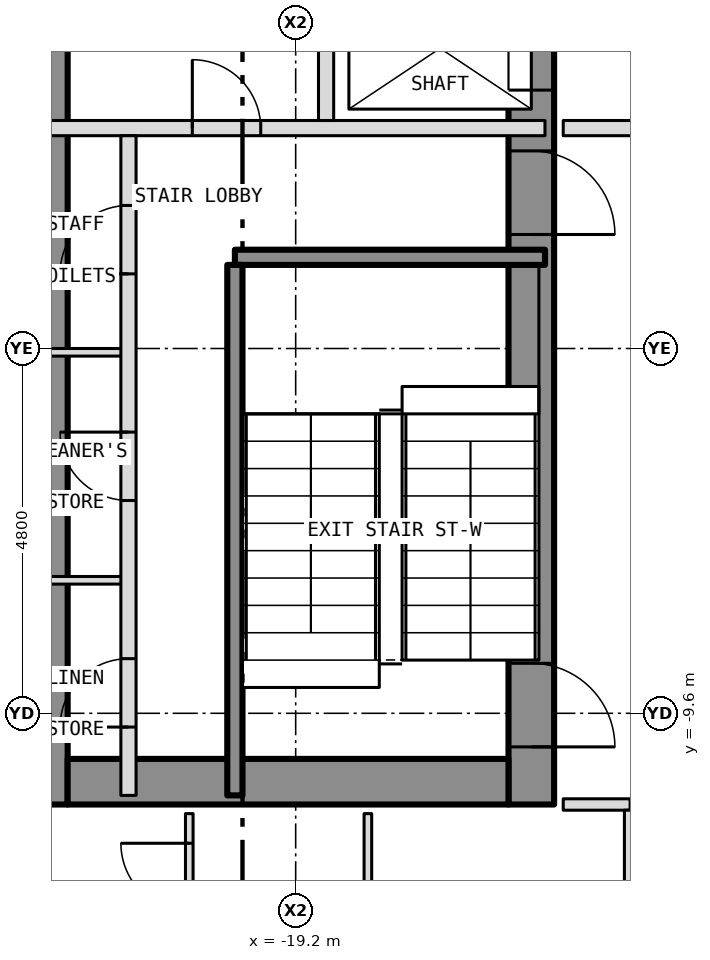
"""IFC4 building model, lengths in metres.
Left out: names, types, materials, properties, quantities, classifications, styles, units other than length and angle.
Written with IfcOpenShell. Run it as: python <this file> out.ifc"""

import sys

from ifc_helpers import new_model, si_unit, direction, frame, frame_2d, origin, place, context, subcontext, project, spatial, rectangle, extrude, element, fill, save


model = new_model("IFC4")
c1 = context("Model", 3, precision=1e-05, world=origin(), true_north=direction((0.0, 1.0)))
c2 = subcontext(c1, "Body", "Model", "MODEL_VIEW")
j1 = project(units=[si_unit("LENGTHUNIT", "METRE"), si_unit("PLANEANGLEUNIT", "RADIAN")], contexts=[c1])
p1 = place(None, origin())
s1 = spatial("IfcSite", under=j1, at=p1, CompositionType="ELEMENT")
p2 = place(p1, origin())
s2 = spatial("IfcBuilding", under=s1, at=p2, CompositionType="ELEMENT")
p3 = place(p2, frame((0.0, 0.0, 110.0)))
s3 = spatial("IfcBuildingStorey", under=s2, at=p3, CompositionType="ELEMENT", Elevation=110.0)
p4 = place(p3, frame((-16.1, -10.8, 0.0), z_axis=(0.0, 0.0, 1.0), x_axis=(0.0, 1.0, 0.0)))
e1 = element("IfcWall", 1, at=p4, inside=s3, PredefinedType="SHEAR", context=c2, shape_type="SweptSolid", body=[
    extrude(rectangle(XDim=21.6, YDim=0.6, at=frame_2d((10.8, 0.0))), origin(), (0.0, 0.0, 1.0), 3.25),
])
p5 = place(p4, frame((9.4, 0.0, 0.0)))
e2 = element("IfcOpeningElement", 2, at=p5, cuts=e1, PredefinedType="OPENING", context=c2, shape_type="SweptSolid", body=[
    extrude(rectangle(XDim=1.1, YDim=2.1, at=frame_2d((0.55, 1.05))), frame((0.0, 0.312, 0.0), z_axis=(0.0, -1.0, 0.0), x_axis=(1.0, 0.0, 0.0)), (0.0, 0.0, 1.0), 0.624),
])
p6 = place(p4, frame((11.5, 0.0, 0.0)))
e3 = element("IfcOpeningElement", 3, at=p6, cuts=e1, PredefinedType="OPENING", context=c2, shape_type="SweptSolid", body=[
    extrude(rectangle(XDim=1.1, YDim=2.1, at=frame_2d((0.55, 1.05))), frame((0.0, 0.312, 0.0), z_axis=(0.0, -1.0, 0.0), x_axis=(1.0, 0.0, 0.0)), (0.0, 0.0, 1.0), 0.624),
])
p7 = place(p4, frame((13.6, 0.0, 0.0)))
e4 = element("IfcOpeningElement", 4, at=p7, cuts=e1, PredefinedType="OPENING", context=c2, shape_type="SweptSolid", body=[
    extrude(rectangle(XDim=1.1, YDim=2.1, at=frame_2d((0.55, 1.05))), frame((0.0, 0.312, 0.0), z_axis=(0.0, -1.0, 0.0), x_axis=(1.0, 0.0, 0.0)), (0.0, 0.0, 1.0), 0.624),
])
p8 = place(p4, frame((15.7, 0.0, 0.0)))
e5 = element("IfcOpeningElement", 5, at=p8, cuts=e1, PredefinedType="OPENING", context=c2, shape_type="SweptSolid", body=[
    extrude(rectangle(XDim=1.1, YDim=2.1, at=frame_2d((0.55, 1.05))), frame((0.0, 0.312, 0.0), z_axis=(0.0, -1.0, 0.0), x_axis=(1.0, 0.0, 0.0)), (0.0, 0.0, 1.0), 0.624),
])
p9 = place(p4, frame((17.8, 0.0, 0.0)))
e6 = element("IfcOpeningElement", 6, at=p9, cuts=e1, PredefinedType="OPENING", context=c2, shape_type="SweptSolid", body=[
    extrude(rectangle(XDim=1.1, YDim=2.1, at=frame_2d((0.55, 1.05))), frame((0.0, 0.312, 0.0), z_axis=(0.0, -1.0, 0.0), x_axis=(1.0, 0.0, 0.0)), (0.0, 0.0, 1.0), 0.624),
])
p10 = place(p4, frame((0.758, 0.0, 0.0)))
e7 = element("IfcOpeningElement", 7, at=p10, cuts=e1, PredefinedType="OPENING", context=c2, shape_type="SweptSolid", body=[
    extrude(rectangle(XDim=1.1, YDim=2.1, at=frame_2d((0.55, 1.05))), frame((0.0, 0.312, 0.0), z_axis=(0.0, -1.0, 0.0), x_axis=(1.0, 0.0, 0.0)), (0.0, 0.0, 1.0), 0.624),
])
p11 = place(p4, frame((7.5, 0.0, 0.0)))
e8 = element("IfcOpeningElement", 8, at=p11, cuts=e1, PredefinedType="OPENING", context=c2, shape_type="SweptSolid", body=[
    extrude(rectangle(XDim=1.1, YDim=2.1, at=frame_2d((0.55, 1.05))), frame((0.0, 0.312, 0.0), z_axis=(0.0, -1.0, 0.0), x_axis=(1.0, 0.0, 0.0)), (0.0, 0.0, 1.0), 0.624),
])
p12 = place(p3, frame((-22.5, -10.8, 0.0), z_axis=(0.0, 0.0, 1.0), x_axis=(0.0, 1.0, 0.0)))
e9 = element("IfcWall", 9, at=p12, inside=s3, PredefinedType="SHEAR", context=c2, shape_type="SweptSolid", body=[
    extrude(rectangle(XDim=21.6, YDim=0.6, at=frame_2d((10.8, 0.0))), origin(), (0.0, 0.0, 1.0), 3.25),
])
p13 = place(p3, frame((-22.2, -10.5, 0.0), z_axis=(0.0, 0.0, 1.0), x_axis=(1.0, 0.0, 0.0)))
e10 = element("IfcWall", 10, at=p13, inside=s3, PredefinedType="SHEAR", context=c2, shape_type="SweptSolid", body=[
    extrude(rectangle(XDim=5.8, YDim=0.6, at=frame_2d((2.9, 0.0))), origin(), (0.0, 0.0, 1.0), 3.25),
])
p14 = place(p3, frame((-15.68, -10.8, 0.0), z_axis=(0.0, 0.0, 1.0), x_axis=(1.0, 0.0, 0.0)))
e11 = element("IfcWall", 11, at=p14, inside=s3, PredefinedType="PARTITIONING", context=c2, shape_type="SweptSolid", body=[
    extrude(rectangle(XDim=0.88, YDim=0.15, at=frame_2d((0.44, 0.0))), origin(), (0.0, 0.0, 1.0), 3.35),
])
for number, where, z_axis, x_axis in (
    (12, (-22.68, -7.85, 0.0), (0.0, 0.0, 1.0), (1.0, 0.0, 0.0)),
    (13, (-22.68, -4.85, 0.0), (0.0, 0.0, 1.0), (1.0, 0.0, 0.0)),
):
    element("IfcWall", number, at=place(p3, frame(where, z_axis=z_axis, x_axis=x_axis)), inside=s3, PredefinedType="PARTITIONING", context=c2, shape_type="SweptSolid", body=[
        extrude(rectangle(XDim=1.28, YDim=0.1, at=frame_2d((0.64, 0.0))), origin(), (0.0, 0.0, 1.0), 3.25),
    ])
p15 = place(p3, frame((-20.0, -3.6, 0.0), z_axis=(0.0, 0.0, 1.0), x_axis=(1.0, 0.0, 0.0)))
e14 = element("IfcWall", 14, at=p15, inside=s3, PredefinedType="SHEAR", context=c2, shape_type="SweptSolid", body=[
    extrude(rectangle(XDim=4.08, YDim=0.2, at=frame_2d((2.04, 0.0))), origin(), (0.0, 0.0, 1.0), 3.25),
])
p16 = place(p3, frame((-22.68, -1.9, 0.0), z_axis=(0.0, 0.0, 1.0), x_axis=(1.0, 0.0, 0.0)))
e15 = element("IfcWall", 15, at=p16, inside=s3, PredefinedType="PARTITIONING", context=c2, shape_type="SweptSolid", body=[
    extrude(rectangle(XDim=6.76, YDim=0.2, at=frame_2d((3.38, 0.0))), origin(), (0.0, 0.0, 1.0), 3.25),
])
p17 = place(p16, frame((2.12, 0.0, 0.0)))
e16 = element("IfcOpeningElement", 16, at=p17, cuts=e15, PredefinedType="OPENING", context=c2, shape_type="SweptSolid", body=[
    extrude(rectangle(XDim=0.9, YDim=2.1, at=frame_2d((0.45, 1.05))), frame((0.0, 0.112, 0.0), z_axis=(0.0, -1.0, 0.0), x_axis=(1.0, 0.0, 0.0)), (0.0, 0.0, 1.0), 0.224),
])
p18 = place(p3, frame((-15.68, -1.9, 0.0), z_axis=(0.0, 0.0, 1.0), x_axis=(1.0, 0.0, 0.0)))
e17 = element("IfcWall", 17, at=p18, inside=s3, PredefinedType="PARTITIONING", context=c2, shape_type="SweptSolid", body=[
    extrude(rectangle(XDim=3.28, YDim=0.2, at=frame_2d((1.64, 0.0))), origin(), (0.0, 0.0, 1.0), 3.35),
])
p19 = place(p18, frame((0.94, 0.0, 0.0)))
e18 = element("IfcOpeningElement", 18, at=p19, cuts=e17, PredefinedType="OPENING", context=c2, shape_type="SweptSolid", body=[
    extrude(rectangle(XDim=1.1, YDim=2.1, at=frame_2d((0.55, 1.05))), frame((0.0, 0.112, 0.0), z_axis=(0.0, -1.0, 0.0), x_axis=(1.0, 0.0, 0.0)), (0.0, 0.0, 1.0), 0.224),
])
p20 = place(p3, frame((-21.4, -10.68, 0.0), z_axis=(0.0, 0.0, 1.0), x_axis=(0.0, 1.0, 0.0)))
e19 = element("IfcWall", 19, at=p20, inside=s3, PredefinedType="PARTITIONING", context=c2, shape_type="SweptSolid", body=[
    extrude(rectangle(XDim=8.68, YDim=0.2, at=frame_2d((4.34, 0.0))), origin(), (0.0, 0.0, 1.0), 3.25),
])
p21 = place(p20, frame((0.899, 0.0, 0.0)))
e20 = element("IfcOpeningElement", 20, at=p21, cuts=e19, PredefinedType="OPENING", context=c2, shape_type="SweptSolid", body=[
    extrude(rectangle(XDim=0.9, YDim=2.1, at=frame_2d((0.45, 1.05))), frame((0.0, 0.112, 0.0), z_axis=(0.0, -1.0, 0.0), x_axis=(1.0, 0.0, 0.0)), (0.0, 0.0, 1.0), 0.224),
])
p22 = place(p20, frame((3.88, 0.0, 0.0)))
e21 = element("IfcOpeningElement", 21, at=p22, cuts=e19, PredefinedType="OPENING", context=c2, shape_type="SweptSolid", body=[
    extrude(rectangle(XDim=0.9, YDim=2.1, at=frame_2d((0.45, 1.05))), frame((0.0, 0.112, 0.0), z_axis=(0.0, -1.0, 0.0), x_axis=(1.0, 0.0, 0.0)), (0.0, 0.0, 1.0), 0.224),
])
p23 = place(p20, frame((6.862, 0.0, 0.0)))
e22 = element("IfcOpeningElement", 22, at=p23, cuts=e19, PredefinedType="OPENING", context=c2, shape_type="SweptSolid", body=[
    extrude(rectangle(XDim=0.9, YDim=2.1, at=frame_2d((0.45, 1.05))), frame((0.0, 0.112, 0.0), z_axis=(0.0, -1.0, 0.0), x_axis=(1.0, 0.0, 0.0)), (0.0, 0.0, 1.0), 0.224),
])
p24 = place(p3, frame((-20.6, -13.95, 0.0), z_axis=(0.0, 0.0, 1.0), x_axis=(0.0, 1.0, 0.0)))
e23 = element("IfcWall", 23, at=p24, inside=s3, PredefinedType="PARTITIONING", context=c2, shape_type="SweptSolid", body=[
    extrude(rectangle(XDim=3.03, YDim=0.1, at=frame_2d((1.515, 0.0))), origin(), (0.0, 0.0, 1.0), 3.35),
])
p25 = place(p24, frame((1.74, 0.0, 0.0)))
e24 = element("IfcOpeningElement", 24, at=p25, cuts=e23, PredefinedType="OPENING", context=c2, shape_type="SweptSolid", body=[
    extrude(rectangle(XDim=0.9, YDim=2.1, at=frame_2d((0.45, 1.05))), frame((0.0, 0.062, 0.0), z_axis=(0.0, -1.0, 0.0), x_axis=(1.0, 0.0, 0.0)), (0.0, 0.0, 1.0), 0.124),
])
p26 = place(p3, frame((-20.0, -10.68, 0.0), z_axis=(0.0, 0.0, 1.0), x_axis=(0.0, 1.0, 0.0)))
e25 = element("IfcWall", 25, at=p26, inside=s3, PredefinedType="SHEAR", context=c2, shape_type="SweptSolid", body=[
    extrude(rectangle(XDim=6.98, YDim=0.2, at=frame_2d((3.49, 0.0))), origin(), (0.0, 0.0, 1.0), 3.25),
])
p27 = place(p3, frame((-18.8, -1.8, 0.0), z_axis=(0.0, 0.0, 1.0), x_axis=(0.0, 1.0, 0.0)))
e26 = element("IfcWall", 26, at=p27, inside=s3, PredefinedType="PARTITIONING", context=c2, shape_type="SweptSolid", body=[
    extrude(rectangle(XDim=12.48, YDim=0.2, at=frame_2d((6.24, 0.0))), origin(), (0.0, 0.0, 1.0), 3.25),
])
p28 = place(p3, frame((-18.25, -18.191, 0.0), z_axis=(0.0, 0.0, 1.0), x_axis=(0.0, 1.0, 0.0)))
e27 = element("IfcWall", 27, at=p28, inside=s3, PredefinedType="PARTITIONING", context=c2, shape_type="SweptSolid", body=[
    extrude(rectangle(XDim=7.271, YDim=0.1, at=frame_2d((3.635, 0.0))), origin(), (0.0, 0.0, 1.0), 3.35),
])
p29 = place(p28, frame((0.941, 0.0, 0.0)))
e28 = element("IfcOpeningElement", 28, at=p29, cuts=e27, PredefinedType="OPENING", context=c2, shape_type="SweptSolid", body=[
    extrude(rectangle(XDim=0.9, YDim=2.1, at=frame_2d((0.45, 1.05))), frame((0.0, 0.062, 0.0), z_axis=(0.0, -1.0, 0.0), x_axis=(1.0, 0.0, 0.0)), (0.0, 0.0, 1.0), 0.124),
])
p30 = place(p3, frame((-14.8, -14.725, 0.0), z_axis=(0.0, 0.0, 1.0), x_axis=(0.0, 1.0, 0.0)))
e29 = element("IfcWall", 29, at=p30, inside=s3, PredefinedType="PARTITIONING", context=c2, shape_type="SweptSolid", body=[
    extrude(rectangle(XDim=3.85, YDim=0.15, at=frame_2d((1.925, 0.0))), origin(), (0.0, 0.0, 1.0), 3.35),
])
p31 = place(p30, frame((0.525, 0.0, 0.0)))
e30 = element("IfcOpeningElement", 30, at=p31, cuts=e29, PredefinedType="OPENING", context=c2, shape_type="SweptSolid", body=[
    extrude(rectangle(XDim=1.0, YDim=2.1, at=frame_2d((0.5, 1.05))), frame((0.0, 0.087, 0.0), z_axis=(0.0, -1.0, 0.0), x_axis=(1.0, 0.0, 0.0)), (0.0, 0.0, 1.0), 0.174),
])
p32 = place(p5, origin())
e31 = element("IfcDoor", 31, at=p32, inside=s3, OperationType="SLIDING_TO_LEFT", PredefinedType="DOOR", context=c2, shape_type="SweptSolid", body=[
    extrude(rectangle(XDim=1.1, YDim=2.1, at=frame_2d((0.55, 1.05))), frame((0.0, 0.025, 0.0), z_axis=(0.0, -1.0, 0.0), x_axis=(1.0, 0.0, 0.0)), (0.0, 0.0, 1.0), 0.05),
])
fill(e2, e31)
p33 = place(p10, origin())
e32 = element("IfcDoor", 32, at=p33, inside=s3, OperationType="SINGLE_SWING_LEFT", PredefinedType="DOOR", context=c2, shape_type="SweptSolid", body=[
    extrude(rectangle(XDim=1.1, YDim=2.1, at=frame_2d((0.55, 1.05))), frame((0.0, 0.025, 0.0), z_axis=(0.0, -1.0, 0.0), x_axis=(1.0, 0.0, 0.0)), (0.0, 0.0, 1.0), 0.05),
])
fill(e7, e32)
p34 = place(p11, origin())
e33 = element("IfcDoor", 33, at=p34, inside=s3, OperationType="SINGLE_SWING_LEFT", PredefinedType="DOOR", context=c2, shape_type="SweptSolid", body=[
    extrude(rectangle(XDim=1.1, YDim=2.1, at=frame_2d((0.55, 1.05))), frame((0.0, 0.025, 0.0), z_axis=(0.0, -1.0, 0.0), x_axis=(1.0, 0.0, 0.0)), (0.0, 0.0, 1.0), 0.05),
])
fill(e8, e33)
p35 = place(p21, origin())
e34 = element("IfcDoor", 34, at=p35, inside=s3, OperationType="SINGLE_SWING_LEFT", PredefinedType="DOOR", context=c2, shape_type="SweptSolid", body=[
    extrude(rectangle(XDim=0.9, YDim=2.1, at=frame_2d((0.45, 1.05))), frame((0.0, 0.025, 0.0), z_axis=(0.0, -1.0, 0.0), x_axis=(1.0, 0.0, 0.0)), (0.0, 0.0, 1.0), 0.05),
])
fill(e20, e34)
p36 = place(p22, origin())
e35 = element("IfcDoor", 35, at=p36, inside=s3, OperationType="SINGLE_SWING_RIGHT", PredefinedType="DOOR", context=c2, shape_type="SweptSolid", body=[
    extrude(rectangle(XDim=0.9, YDim=2.1, at=frame_2d((0.45, 1.05))), frame((0.0, 0.025, 0.0), z_axis=(0.0, -1.0, 0.0), x_axis=(1.0, 0.0, 0.0)), (0.0, 0.0, 1.0), 0.05),
])
fill(e21, e35)
p37 = place(p23, origin())
e36 = element("IfcDoor", 36, at=p37, inside=s3, OperationType="SINGLE_SWING_LEFT", PredefinedType="DOOR", context=c2, shape_type="SweptSolid", body=[
    extrude(rectangle(XDim=0.9, YDim=2.1, at=frame_2d((0.45, 1.05))), frame((0.0, 0.025, 0.0), z_axis=(0.0, -1.0, 0.0), x_axis=(1.0, 0.0, 0.0)), (0.0, 0.0, 1.0), 0.05),
])
fill(e22, e36)
p38 = place(p17, origin())
e37 = element("IfcDoor", 37, at=p38, inside=s3, OperationType="SINGLE_SWING_LEFT", PredefinedType="DOOR", context=c2, shape_type="SweptSolid", body=[
    extrude(rectangle(XDim=0.9, YDim=2.1, at=frame_2d((0.45, 1.05))), frame((0.0, 0.025, 0.0), z_axis=(0.0, -1.0, 0.0), x_axis=(1.0, 0.0, 0.0)), (0.0, 0.0, 1.0), 0.05),
])
fill(e16, e37)
p39 = place(p25, origin())
e38 = element("IfcDoor", 38, at=p39, inside=s3, OperationType="SINGLE_SWING_RIGHT", PredefinedType="DOOR", context=c2, shape_type="SweptSolid", body=[
    extrude(rectangle(XDim=0.9, YDim=2.1, at=frame_2d((0.45, 1.05))), frame((0.0, 0.025, 0.0), z_axis=(0.0, -1.0, 0.0), x_axis=(1.0, 0.0, 0.0)), (0.0, 0.0, 1.0), 0.05),
])
fill(e24, e38)
save(model, sys.argv[1])
